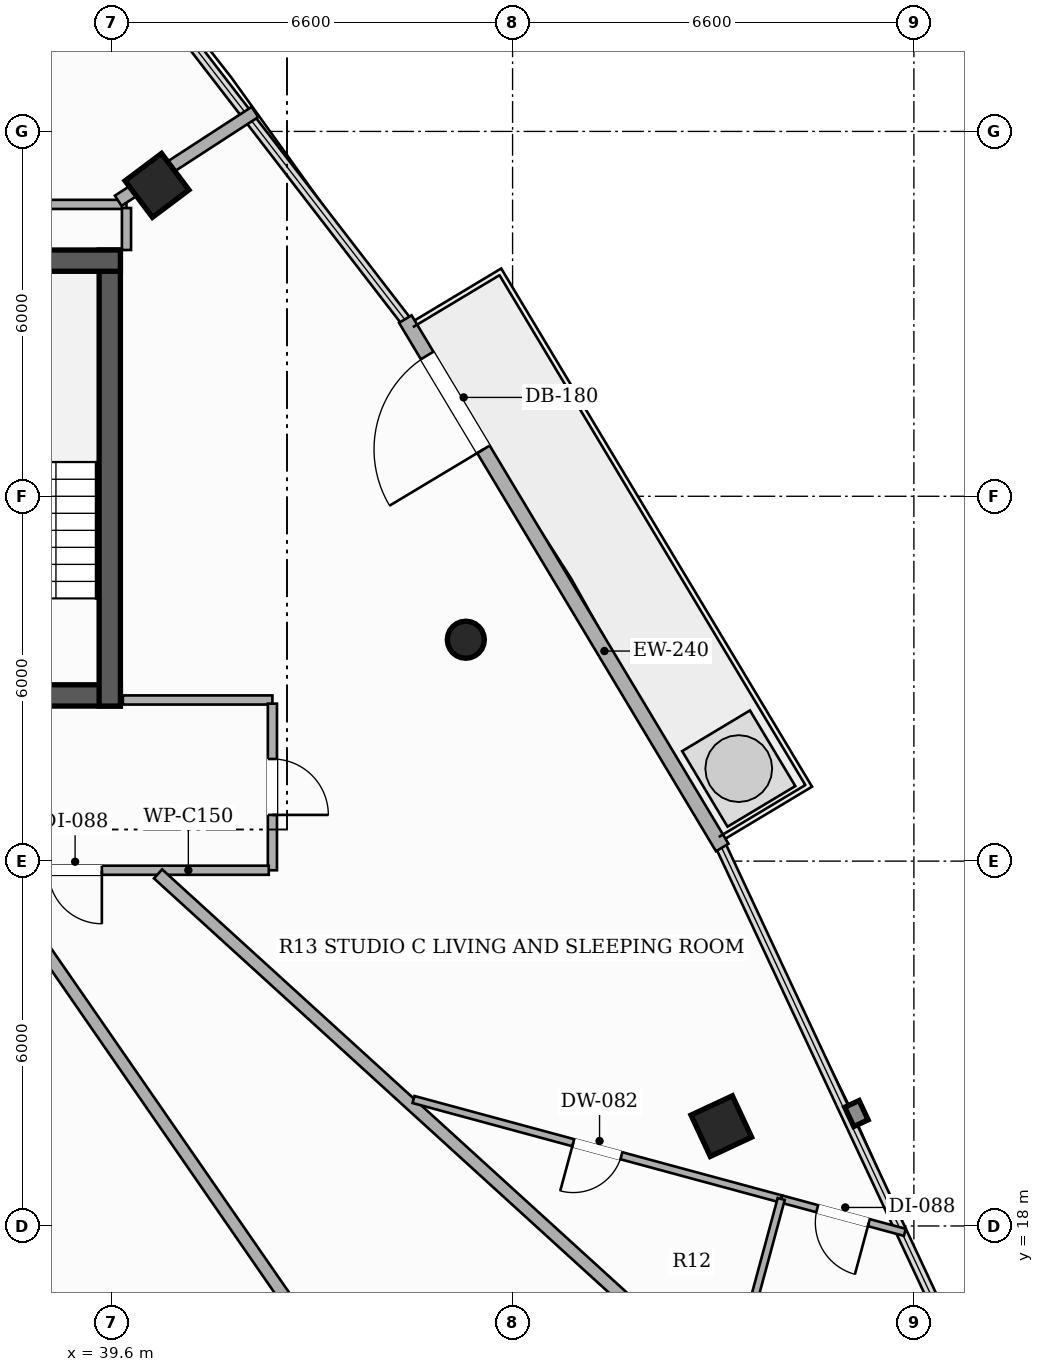
"""IFC4 building model, lengths in metres.
Left out: names, types, materials, properties, quantities, classifications, styles, units other than length and angle.
Written with IfcOpenShell. Run it as: python <this file> out.ifc"""

import sys

from ifc_helpers import new_model, si_unit, direction, frame, frame_2d, origin, origin_2d, place, context, subcontext, project, spatial, rectangle, hollow_rectangle, hollow_circle, extrude, element, fill, save


model = new_model("IFC4")
c1 = context("Model", 3, precision=1e-05, world=origin(), true_north=direction((0.0, 1.0)))
c2 = subcontext(c1, "Body", "Model", "MODEL_VIEW")
j1 = project(units=[si_unit("LENGTHUNIT", "METRE"), si_unit("PLANEANGLEUNIT", "RADIAN")], contexts=[c1])
p1 = place(None, origin())
s1 = spatial("IfcSite", under=j1, at=p1, CompositionType="ELEMENT")
p2 = place(p1, origin())
s2 = spatial("IfcBuilding", under=s1, at=p2, CompositionType="ELEMENT")
p3 = place(p2, frame((0.0, 0.0, 232.7)))
s3 = spatial("IfcBuildingStorey", under=s2, at=p3, CompositionType="ELEMENT", Elevation=232.7)
p4 = place(p3, frame((26.25, 26.725, 0.0), z_axis=(0.0, 0.0, 1.0), x_axis=(1.0, 0.0, 0.0)))
e1 = element("IfcWall", 1, at=p4, inside=s3, PredefinedType="SHEAR", context=c2, shape_type="SweptSolid", body=[
    extrude(rectangle(XDim=13.5, YDim=0.35, at=frame_2d((6.75, 0.0))), origin(), (0.0, 0.0, 1.0), 3.3),
])
p5 = place(p4, frame((4.35, 0.0, 0.0)))
e2 = element("IfcOpeningElement", 2, at=p5, cuts=e1, PredefinedType="OPENING", context=c2, shape_type="SweptSolid", body=[
    extrude(rectangle(XDim=1.05, YDim=2.15, at=frame_2d((0.525, 1.075))), frame((0.0, 0.185, 0.0), z_axis=(0.0, -1.0, 0.0), x_axis=(1.0, 0.0, 0.0)), (0.0, 0.0, 1.0), 0.37),
])
p6 = place(p4, frame((8.3, 0.0, 0.0)))
e3 = element("IfcOpeningElement", 3, at=p6, cuts=e1, PredefinedType="OPENING", context=c2, shape_type="SweptSolid", body=[
    extrude(rectangle(XDim=1.05, YDim=2.15, at=frame_2d((0.525, 1.075))), frame((0.0, 0.185, 0.0), z_axis=(0.0, -1.0, 0.0), x_axis=(1.0, 0.0, 0.0)), (0.0, 0.0, 1.0), 0.37),
])
p7 = place(p3, frame((39.575, 26.55, 0.0), z_axis=(0.0, 0.0, 1.0), x_axis=(0.0, 1.0, 0.0)))
e4 = element("IfcWall", 4, at=p7, inside=s3, PredefinedType="SHEAR", context=c2, shape_type="SweptSolid", body=[
    extrude(rectangle(XDim=7.5, YDim=0.35, at=frame_2d((3.75, 0.0))), origin(), (0.0, 0.0, 1.0), 3.3),
])
p8 = place(p3, frame((36.15, 33.875, 0.0), z_axis=(0.0, 0.0, 1.0), x_axis=(1.0, 0.0, 0.0)))
e5 = element("IfcWall", 5, at=p8, inside=s3, PredefinedType="SHEAR", context=c2, shape_type="SweptSolid", body=[
    extrude(rectangle(XDim=3.6, YDim=0.35, at=frame_2d((1.8, 0.0))), origin(), (0.0, 0.0, 1.0), 3.3),
])
p9 = place(p3, frame((49.633, 19.642, 0.0), z_axis=(0.0, 0.0, 1.0), x_axis=(-0.422618261741, 0.906307787037, 0.0)))
e6 = element("IfcColumn", 6, at=p9, inside=s3, PredefinedType="COLUMN", context=c2, shape_type="SweptSolid", body=[
    extrude(hollow_rectangle(XDim=0.75, YDim=0.75, WallThickness=0.025, at=origin_2d()), origin(), (0.0, 0.0, 1.0), 3.3),
])
p10 = place(p3, frame((45.431, 27.641, 0.0), z_axis=(0.0, 0.0, 1.0), x_axis=(1.0, 0.0, 0.0)))
e7 = element("IfcColumn", 7, at=p10, inside=s3, PredefinedType="COLUMN", context=c2, shape_type="SweptSolid", body=[
    extrude(hollow_circle(Radius=0.305, WallThickness=0.016, at=origin_2d()), origin(), (0.0, 0.0, 1.0), 3.3),
])
p11 = place(p3, frame((40.352, 35.113, 0.0), z_axis=(0.0, 0.0, 1.0), x_axis=(-0.600420225326, 0.799684658487, 0.0)))
e8 = element("IfcColumn", 8, at=p11, inside=s3, PredefinedType="COLUMN", context=c2, shape_type="SweptSolid", body=[
    extrude(hollow_rectangle(XDim=0.75, YDim=0.75, WallThickness=0.025, at=origin_2d()), origin(), (0.0, 0.0, 1.0), 3.3),
])
p12 = place(p3, frame((49.648, 24.224, 0.0), z_axis=(0.0, 0.0, 1.0), x_axis=(-0.514346935205, 0.857582200285, 0.0)))
e9 = element("IfcWall", 9, at=p12, inside=s3, PredefinedType="SOLIDWALL", context=c2, shape_type="SweptSolid", body=[
    extrude(rectangle(XDim=10.133, YDim=0.24, at=frame_2d((5.066, 0.0))), origin(), (0.0, 0.0, 1.0), 2.584),
])
p13 = place(p12, frame((7.635, 0.0, 0.0)))
e10 = element("IfcOpeningElement", 10, at=p13, cuts=e9, PredefinedType="OPENING", context=c2, shape_type="SweptSolid", body=[
    extrude(rectangle(XDim=1.8, YDim=2.2, at=frame_2d((0.9, 1.1))), frame((0.0, 0.13, 0.0), z_axis=(0.0, -1.0, 0.0), x_axis=(1.0, 0.0, 0.0)), (0.0, 0.0, 1.0), 0.26),
])
p14 = place(p3, frame((39.79, 26.65, 0.0), z_axis=(0.0, 0.0, 1.0), x_axis=(1.0, 0.0, 0.0)))
e11 = element("IfcWall", 11, at=p14, inside=s3, PredefinedType="PARTITIONING", context=c2, shape_type="SweptSolid", body=[
    extrude(rectangle(XDim=2.46, YDim=0.15, at=frame_2d((1.23, 0.0))), origin(), (0.0, 0.0, 1.0), 2.525),
])
p15 = place(p3, frame((42.25, 26.59, 0.0), z_axis=(0.0, 0.0, 1.0), x_axis=(0.0, -1.0, 0.0)))
e12 = element("IfcWall", 12, at=p15, inside=s3, PredefinedType="PARTITIONING", context=c2, shape_type="SweptSolid", body=[
    extrude(rectangle(XDim=2.74, YDim=0.15, at=frame_2d((1.37, 0.0))), origin(), (0.0, 0.0, 1.0), 2.733),
])
p16 = place(p15, frame((0.91, 0.0, 0.0)))
e13 = element("IfcOpeningElement", 13, at=p16, cuts=e12, PredefinedType="OPENING", context=c2, shape_type="SweptSolid", body=[
    extrude(rectangle(XDim=0.92, YDim=2.15, at=frame_2d((0.46, 1.075))), frame((0.0, 0.085, 0.0), z_axis=(0.0, -1.0, 0.0), x_axis=(1.0, 0.0, 0.0)), (0.0, 0.0, 1.0), 0.17),
])
p17 = place(p3, frame((42.19, 23.85, 0.0), z_axis=(0.0, 0.0, 1.0), x_axis=(-1.0, 0.0, 0.0)))
e14 = element("IfcWall", 14, at=p17, inside=s3, PredefinedType="PARTITIONING", context=c2, shape_type="SweptSolid", body=[
    extrude(rectangle(XDim=8.286, YDim=0.15, at=frame_2d((4.143, 0.0))), origin(), (0.0, 0.0, 1.0), 2.525),
])
p18 = place(p17, frame((5.824, 0.0, 0.0)))
e15 = element("IfcOpeningElement", 15, at=p18, cuts=e14, PredefinedType="OPENING", context=c2, shape_type="SweptSolid", body=[
    extrude(rectangle(XDim=0.88, YDim=2.1, at=frame_2d((0.44, 1.05))), frame((0.0, 0.085, 0.0), z_axis=(0.0, -1.0, 0.0), x_axis=(1.0, 0.0, 0.0)), (0.0, 0.0, 1.0), 0.17),
])
p19 = place(p17, frame((2.745, 0.0, 0.0)))
e16 = element("IfcOpeningElement", 16, at=p19, cuts=e14, PredefinedType="OPENING", context=c2, shape_type="SweptSolid", body=[
    extrude(rectangle(XDim=0.88, YDim=2.1, at=frame_2d((0.44, 1.05))), frame((0.0, 0.085, 0.0), z_axis=(0.0, -1.0, 0.0), x_axis=(1.0, 0.0, 0.0)), (0.0, 0.0, 1.0), 0.17),
])
p20 = place(p3, frame((36.31, 34.8, 0.0), z_axis=(0.0, 0.0, 1.0), x_axis=(1.0, 0.0, 0.0)))
e17 = element("IfcWall", 17, at=p20, inside=s3, PredefinedType="PARTITIONING", context=c2, shape_type="SweptSolid", body=[
    extrude(rectangle(XDim=3.54, YDim=0.15, at=frame_2d((1.77, 0.0))), origin(), (0.0, 0.0, 1.0), 2.385),
])
p21 = place(p3, frame((39.85, 34.74, 0.0), z_axis=(0.0, 0.0, 1.0), x_axis=(0.0, -1.0, 0.0)))
e18 = element("IfcWall", 18, at=p21, inside=s3, PredefinedType="PARTITIONING", context=c2, shape_type="SweptSolid", body=[
    extrude(rectangle(XDim=0.69, YDim=0.15, at=frame_2d((0.345, 0.0))), origin(), (0.0, 0.0, 1.0), 2.733),
])
p22 = place(p3, frame((37.641, 23.79, 0.0), z_axis=(0.0, 0.0, 1.0), x_axis=(0.568876812748, -0.822422745258, 0.0)))
e19 = element("IfcWall", 19, at=p22, inside=s3, PredefinedType="PARTITIONING", context=c2, shape_type="SweptSolid", body=[
    extrude(rectangle(XDim=21.342, YDim=0.2, at=frame_2d((10.671, 0.0))), origin(), (0.0, 0.0, 1.0), 2.452),
])
p23 = place(p3, frame((55.919, 9.631, 0.0), z_axis=(0.0, 0.0, 1.0), x_axis=(-0.739406671307, 0.673259069324, 0.0)))
e20 = element("IfcWall", 20, at=p23, inside=s3, PredefinedType="PARTITIONING", context=c2, shape_type="SweptSolid", body=[
    extrude(rectangle(XDim=21.031, YDim=0.2, at=frame_2d((10.515, 0.0))), origin(), (0.0, 0.0, 1.0), 2.452),
])
p24 = place(p3, frame((39.714, 34.86, 0.0), z_axis=(0.0, 0.0, 1.0), x_axis=(0.838740992226, 0.54453057578, 0.0)))
e21 = element("IfcWall", 21, at=p24, inside=s3, PredefinedType="PARTITIONING", context=c2, shape_type="SweptSolid", body=[
    extrude(rectangle(XDim=2.681, YDim=0.2, at=frame_2d((1.341, 0.0))), origin(), (0.0, 0.0, 1.0), 2.452),
])
p25 = place(p3, frame((50.618, 18.444, 0.0), z_axis=(0.0, 0.0, 1.0), x_axis=(-0.96530580675, 0.261122001091, 0.0)))
e22 = element("IfcWall", 22, at=p25, inside=s3, PredefinedType="PARTITIONING", context=c2, shape_type="SweptSolid", body=[
    extrude(rectangle(XDim=6.265, YDim=0.12, at=frame_2d((3.133, 0.0))), origin(), (0.0, 0.0, 1.0), 2.452),
])
p26 = place(p25, frame((2.723, 0.0, 0.0)))
e23 = element("IfcOpeningElement", 23, at=p26, cuts=e22, PredefinedType="OPENING", context=c2, shape_type="SweptSolid", body=[
    extrude(rectangle(XDim=0.82, YDim=2.1, at=frame_2d((0.41, 1.05))), frame((0.0, 0.07, 0.0), z_axis=(0.0, -1.0, 0.0), x_axis=(1.0, 0.0, 0.0)), (0.0, 0.0, 1.0), 0.14),
])
p27 = place(p3, frame((52.651, 17.895, 0.0), z_axis=(0.0, 0.0, 1.0), x_axis=(-0.96540836449, 0.260742573765, 0.0)))
e24 = element("IfcWall", 24, at=p27, inside=s3, PredefinedType="PARTITIONING", context=c2, shape_type="SweptSolid", body=[
    extrude(rectangle(XDim=2.106, YDim=0.12, at=frame_2d((1.053, 0.0))), origin(), (0.0, 0.0, 1.0), 2.579),
])
p28 = place(p27, frame((0.613, 0.0, 0.0)))
e25 = element("IfcOpeningElement", 25, at=p28, cuts=e24, PredefinedType="OPENING", context=c2, shape_type="SweptSolid", body=[
    extrude(rectangle(XDim=0.88, YDim=2.1, at=frame_2d((0.44, 1.05))), frame((0.0, 0.07, 0.0), z_axis=(0.0, -1.0, 0.0), x_axis=(1.0, 0.0, 0.0)), (0.0, 0.0, 1.0), 0.14),
])
p29 = place(p3, frame((50.618, 18.444, 0.0), z_axis=(0.0, 0.0, 1.0), x_axis=(-0.260928129887, -0.965358229381, 0.0)))
e26 = element("IfcWall", 26, at=p29, inside=s3, PredefinedType="PARTITIONING", context=c2, shape_type="SweptSolid", body=[
    extrude(rectangle(XDim=3.219, YDim=0.12, at=frame_2d((1.609, 0.0))), origin(), (0.0, 0.0, 1.0), 2.452),
])
p30 = place(p13, origin())
e27 = element("IfcDoor", 27, at=p30, inside=s3, OperationType="SINGLE_SWING_LEFT", PredefinedType="DOOR", context=c2, shape_type="SweptSolid", body=[
    extrude(rectangle(XDim=1.8, YDim=2.2, at=frame_2d((0.9, 1.1))), frame((0.0, 0.025, 0.0), z_axis=(0.0, -1.0, 0.0), x_axis=(1.0, 0.0, 0.0)), (0.0, 0.0, 1.0), 0.05),
])
fill(e10, e27)
p31 = place(p16, origin())
e28 = element("IfcDoor", 28, at=p31, inside=s3, OperationType="SINGLE_SWING_RIGHT", PredefinedType="DOOR", context=c2, shape_type="SweptSolid", body=[
    extrude(rectangle(XDim=0.92, YDim=2.15, at=frame_2d((0.46, 1.075))), frame((0.0, 0.025, 0.0), z_axis=(0.0, -1.0, 0.0), x_axis=(1.0, 0.0, 0.0)), (0.0, 0.0, 1.0), 0.05),
])
fill(e13, e28)
p32 = place(p26, origin())
e29 = element("IfcDoor", 29, at=p32, inside=s3, OperationType="SINGLE_SWING_RIGHT", PredefinedType="DOOR", context=c2, shape_type="SweptSolid", body=[
    extrude(rectangle(XDim=0.82, YDim=2.1, at=frame_2d((0.41, 1.05))), frame((0.0, 0.025, 0.0), z_axis=(0.0, -1.0, 0.0), x_axis=(1.0, 0.0, 0.0)), (0.0, 0.0, 1.0), 0.05),
])
fill(e23, e29)
p33 = place(p28, origin())
e30 = element("IfcDoor", 30, at=p33, inside=s3, OperationType="SINGLE_SWING_LEFT", PredefinedType="DOOR", context=c2, shape_type="SweptSolid", body=[
    extrude(rectangle(XDim=0.88, YDim=2.1, at=frame_2d((0.44, 1.05))), frame((0.0, 0.025, 0.0), z_axis=(0.0, -1.0, 0.0), x_axis=(1.0, 0.0, 0.0)), (0.0, 0.0, 1.0), 0.05),
])
fill(e25, e30)
p34 = place(p19, origin())
e31 = element("IfcDoor", 31, at=p34, inside=s3, OperationType="SINGLE_SWING_LEFT", PredefinedType="DOOR", context=c2, shape_type="SweptSolid", body=[
    extrude(rectangle(XDim=0.88, YDim=2.1, at=frame_2d((0.44, 1.05))), frame((0.0, 0.025, 0.0), z_axis=(0.0, -1.0, 0.0), x_axis=(1.0, 0.0, 0.0)), (0.0, 0.0, 1.0), 0.05),
])
fill(e16, e31)
save(model, sys.argv[1])
